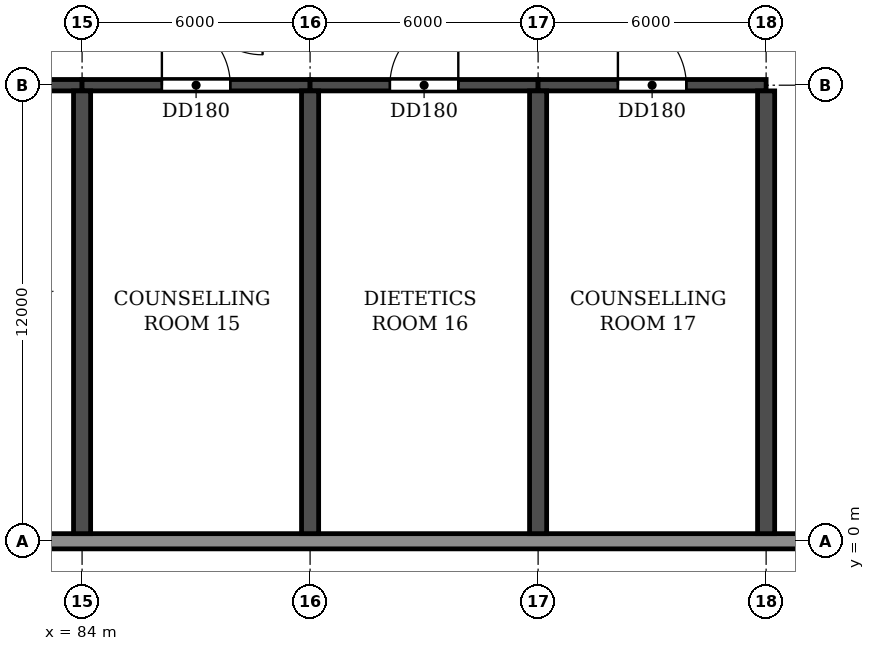
"""IFC4 building model, lengths in metres.
Left out: names, types, materials, properties, quantities, classifications, styles, units other than length and angle.
Written with IfcOpenShell. Run it as: python <this file> out.ifc"""

import sys

from ifc_helpers import new_model, si_unit, direction, frame, frame_2d, origin, place, context, subcontext, project, spatial, rectangle, extrude, element, fill, save


model = new_model("IFC4")
c1 = context("Model", 3, precision=1e-05, world=origin(), true_north=direction((0.0, 1.0)))
c2 = subcontext(c1, "Body", "Model", "MODEL_VIEW")
j1 = project(units=[si_unit("LENGTHUNIT", "METRE"), si_unit("PLANEANGLEUNIT", "RADIAN")], contexts=[c1])
p1 = place(None, origin())
s1 = spatial("IfcSite", under=j1, at=p1, CompositionType="ELEMENT")
p2 = place(p1, origin())
s2 = spatial("IfcBuilding", under=s1, at=p2, CompositionType="ELEMENT")
p3 = place(p2, frame((0.0, 0.0, 10.8)))
s3 = spatial("IfcBuildingStorey", under=s2, at=p3, CompositionType="ELEMENT", Elevation=10.8)
for number, where, z_axis, x_axis in (
    (1, (84.0, 0.2, 0.0), (0.0, 0.0, 1.0), (0.0, 1.0, 0.0)),
    (2, (90.0, 0.2, 0.0), (0.0, 0.0, 1.0), (0.0, 1.0, 0.0)),
    (3, (96.0, 0.2, 0.0), (0.0, 0.0, 1.0), (0.0, 1.0, 0.0)),
    (4, (102.0, 0.2, 0.0), (0.0, 0.0, 1.0), (0.0, 1.0, 0.0)),
):
    element("IfcWall", number, at=place(p3, frame(where, z_axis=z_axis, x_axis=x_axis)), inside=s3, PredefinedType="SHEAR", context=c2, shape_type="SweptSolid", body=[
        extrude(rectangle(XDim=11.65, YDim=0.45, at=frame_2d((5.825, 0.0))), origin(), (0.0, 0.0, 1.0), 3.92),
    ])
p4 = place(p3, frame((78.0, 12.0, 0.0), z_axis=(0.0, 0.0, 1.0), x_axis=(1.0, 0.0, 0.0)))
e5 = element("IfcWall", 5, at=p4, inside=s3, PredefinedType="SHEAR", context=c2, shape_type="SweptSolid", body=[
    extrude(rectangle(XDim=6.0, YDim=0.3, at=frame_2d((3.0, 0.0))), origin(), (0.0, 0.0, 1.0), 3.32),
])
p5 = place(p4, frame((2.1, 0.0, 0.0)))
e6 = element("IfcOpeningElement", 6, at=p5, cuts=e5, PredefinedType="OPENING", context=c2, shape_type="SweptSolid", body=[
    extrude(rectangle(XDim=1.8, YDim=2.1, at=frame_2d((0.9, 1.05))), frame((0.0, 0.16, 0.0), z_axis=(0.0, -1.0, 0.0), x_axis=(1.0, 0.0, 0.0)), (0.0, 0.0, 1.0), 0.32),
])
p6 = place(p3, frame((84.0, 12.0, 0.0), z_axis=(0.0, 0.0, 1.0), x_axis=(1.0, 0.0, 0.0)))
e7 = element("IfcWall", 7, at=p6, inside=s3, PredefinedType="SHEAR", context=c2, shape_type="SweptSolid", body=[
    extrude(rectangle(XDim=6.0, YDim=0.3, at=frame_2d((3.0, 0.0))), origin(), (0.0, 0.0, 1.0), 3.32),
])
p7 = place(p6, frame((2.1, 0.0, 0.0)))
e8 = element("IfcOpeningElement", 8, at=p7, cuts=e7, PredefinedType="OPENING", context=c2, shape_type="SweptSolid", body=[
    extrude(rectangle(XDim=1.8, YDim=2.1, at=frame_2d((0.9, 1.05))), frame((0.0, 0.16, 0.0), z_axis=(0.0, -1.0, 0.0), x_axis=(1.0, 0.0, 0.0)), (0.0, 0.0, 1.0), 0.32),
])
p8 = place(p3, frame((90.0, 12.0, 0.0), z_axis=(0.0, 0.0, 1.0), x_axis=(1.0, 0.0, 0.0)))
e9 = element("IfcWall", 9, at=p8, inside=s3, PredefinedType="SHEAR", context=c2, shape_type="SweptSolid", body=[
    extrude(rectangle(XDim=6.0, YDim=0.3, at=frame_2d((3.0, 0.0))), origin(), (0.0, 0.0, 1.0), 3.32),
])
p9 = place(p8, frame((2.1, 0.0, 0.0)))
e10 = element("IfcOpeningElement", 10, at=p9, cuts=e9, PredefinedType="OPENING", context=c2, shape_type="SweptSolid", body=[
    extrude(rectangle(XDim=1.8, YDim=2.1, at=frame_2d((0.9, 1.05))), frame((0.0, 0.16, 0.0), z_axis=(0.0, -1.0, 0.0), x_axis=(1.0, 0.0, 0.0)), (0.0, 0.0, 1.0), 0.32),
])
p10 = place(p3, frame((96.0, 12.0, 0.0), z_axis=(0.0, 0.0, 1.0), x_axis=(1.0, 0.0, 0.0)))
e11 = element("IfcWall", 11, at=p10, inside=s3, PredefinedType="SHEAR", context=c2, shape_type="SweptSolid", body=[
    extrude(rectangle(XDim=6.0, YDim=0.3, at=frame_2d((3.0, 0.0))), origin(), (0.0, 0.0, 1.0), 3.32),
])
p11 = place(p10, frame((2.1, 0.0, 0.0)))
e12 = element("IfcOpeningElement", 12, at=p11, cuts=e11, PredefinedType="OPENING", context=c2, shape_type="SweptSolid", body=[
    extrude(rectangle(XDim=1.8, YDim=2.1, at=frame_2d((0.9, 1.05))), frame((0.0, 0.16, 0.0), z_axis=(0.0, -1.0, 0.0), x_axis=(1.0, 0.0, 0.0)), (0.0, 0.0, 1.0), 0.32),
])
p12 = place(p3, frame((-3.0, 0.0, 0.0), z_axis=(0.0, 0.0, 1.0), x_axis=(1.0, 0.0, 0.0)))
e13 = element("IfcWall", 13, at=p12, inside=s3, PredefinedType="STANDARD", context=c2, shape_type="SweptSolid", body=[
    extrude(rectangle(XDim=108.0, YDim=0.4, at=frame_2d((54.0, 0.0))), origin(), (0.0, 0.0, 1.0), 3.92),
])
p13 = place(p12, frame((33.4, 0.0, 0.9)))
e14 = element("IfcOpeningElement", 14, at=p13, cuts=e13, PredefinedType="OPENING", context=c2, shape_type="SweptSolid", body=[
    extrude(rectangle(XDim=2.2, YDim=2.7, at=frame_2d((1.1, 1.35))), frame((0.0, 0.21, 0.0), z_axis=(0.0, -1.0, 0.0), x_axis=(1.0, 0.0, 0.0)), (0.0, 0.0, 1.0), 0.42),
])
p14 = place(p12, frame((36.4, 0.0, 0.9)))
e15 = element("IfcOpeningElement", 15, at=p14, cuts=e13, PredefinedType="OPENING", context=c2, shape_type="SweptSolid", body=[
    extrude(rectangle(XDim=2.2, YDim=2.7, at=frame_2d((1.1, 1.35))), frame((0.0, 0.21, 0.0), z_axis=(0.0, -1.0, 0.0), x_axis=(1.0, 0.0, 0.0)), (0.0, 0.0, 1.0), 0.42),
])
p15 = place(p12, frame((69.4, 0.0, 0.9)))
e16 = element("IfcOpeningElement", 16, at=p15, cuts=e13, PredefinedType="OPENING", context=c2, shape_type="SweptSolid", body=[
    extrude(rectangle(XDim=2.2, YDim=2.7, at=frame_2d((1.1, 1.35))), frame((0.0, 0.21, 0.0), z_axis=(0.0, -1.0, 0.0), x_axis=(1.0, 0.0, 0.0)), (0.0, 0.0, 1.0), 0.42),
])
p16 = place(p12, frame((72.4, 0.0, 0.9)))
e17 = element("IfcOpeningElement", 17, at=p16, cuts=e13, PredefinedType="OPENING", context=c2, shape_type="SweptSolid", body=[
    extrude(rectangle(XDim=2.2, YDim=2.7, at=frame_2d((1.1, 1.35))), frame((0.0, 0.21, 0.0), z_axis=(0.0, -1.0, 0.0), x_axis=(1.0, 0.0, 0.0)), (0.0, 0.0, 1.0), 0.42),
])
p17 = place(p7, origin())
e18 = element("IfcDoor", 18, at=p17, inside=s3, OperationType="DOUBLE_DOOR_SINGLE_SWING", PredefinedType="DOOR", context=c2, shape_type="SweptSolid", body=[
    extrude(rectangle(XDim=1.8, YDim=2.1, at=frame_2d((0.9, 1.05))), frame((0.0, 0.025, 0.0), z_axis=(0.0, -1.0, 0.0), x_axis=(1.0, 0.0, 0.0)), (0.0, 0.0, 1.0), 0.05),
])
fill(e8, e18)
p18 = place(p9, origin())
e19 = element("IfcDoor", 19, at=p18, inside=s3, OperationType="DOUBLE_DOOR_SINGLE_SWING", PredefinedType="DOOR", context=c2, shape_type="SweptSolid", body=[
    extrude(rectangle(XDim=1.8, YDim=2.1, at=frame_2d((0.9, 1.05))), frame((0.0, 0.025, 0.0), z_axis=(0.0, -1.0, 0.0), x_axis=(1.0, 0.0, 0.0)), (0.0, 0.0, 1.0), 0.05),
])
fill(e10, e19)
p19 = place(p11, origin())
e20 = element("IfcDoor", 20, at=p19, inside=s3, OperationType="DOUBLE_DOOR_SINGLE_SWING", PredefinedType="DOOR", context=c2, shape_type="SweptSolid", body=[
    extrude(rectangle(XDim=1.8, YDim=2.1, at=frame_2d((0.9, 1.05))), frame((0.0, 0.025, 0.0), z_axis=(0.0, -1.0, 0.0), x_axis=(1.0, 0.0, 0.0)), (0.0, 0.0, 1.0), 0.05),
])
fill(e12, e20)
save(model, sys.argv[1])
